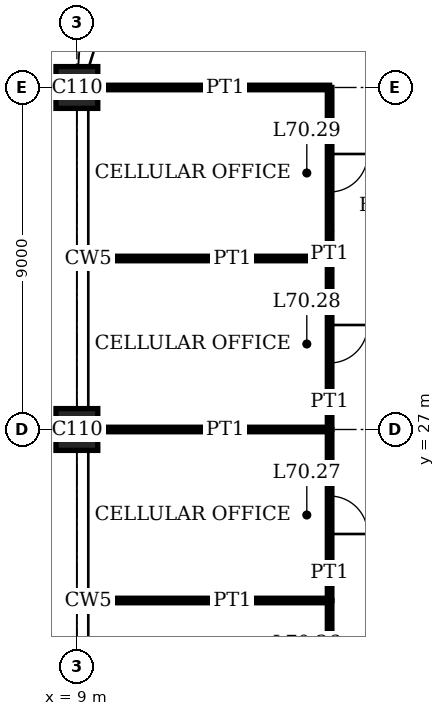
"""IFC4 building model, lengths in metres.
Left out: names, types, materials, properties, quantities, classifications, styles, units other than length and angle.
Written with IfcOpenShell. Run it as: python <this file> out.ifc"""

import sys

from ifc_helpers import new_model, si_unit, direction, frame, frame_2d, origin, origin_2d, place, context, subcontext, project, spatial, rectangle, extrude, element, fill, save


model = new_model("IFC4")
c1 = context("Model", 3, precision=1e-05, world=origin(), true_north=direction((0.0, 1.0)))
c2 = subcontext(c1, "Body", "Model", "MODEL_VIEW")
j1 = project(units=[si_unit("LENGTHUNIT", "METRE"), si_unit("PLANEANGLEUNIT", "RADIAN")], contexts=[c1])
p1 = place(None, origin())
s1 = spatial("IfcSite", under=j1, at=p1, CompositionType="ELEMENT")
p2 = place(p1, origin())
s2 = spatial("IfcBuilding", under=s1, at=p2, CompositionType="ELEMENT")
p3 = place(p2, frame((0.0, 0.0, 287.4)))
s3 = spatial("IfcBuildingStorey", under=s2, at=p3, CompositionType="ELEMENT", Elevation=287.4)
for number, where, z_axis, x_axis in (
    (1, (9.0, 27.0, 0.0), (0.0, 0.0, 1.0), (1.0, 0.0, 0.0)),
    (2, (9.0, 36.0, 0.0), (0.0, 0.0, 1.0), (1.0, 0.0, 0.0)),
):
    element("IfcColumn", number, at=place(p3, frame(where, z_axis=z_axis, x_axis=x_axis)), inside=s3, PredefinedType="COLUMN", context=c2, shape_type="SweptSolid", body=[
        extrude(rectangle(XDim=1.1, YDim=1.1, at=origin_2d()), origin(), (0.0, 0.0, 1.0), 4.0),
    ])
p4 = place(p3, frame((9.31, 22.5, 0.0), z_axis=(0.0, 0.0, 1.0), x_axis=(1.0, 0.0, 0.0)))
e3 = element("IfcWall", 3, at=p4, inside=s3, PredefinedType="PARTITIONING", context=c2, shape_type="SweptSolid", body=[
    extrude(rectangle(XDim=6.34, YDim=0.12, at=frame_2d((3.17, 0.0))), origin(), (0.0, 0.0, 1.0), 3.1),
])
p5 = place(p3, frame((9.55, 27.0, 0.0), z_axis=(0.0, 0.0, 1.0), x_axis=(1.0, 0.0, 0.0)))
e4 = element("IfcWall", 4, at=p5, inside=s3, PredefinedType="PARTITIONING", context=c2, shape_type="SweptSolid", body=[
    extrude(rectangle(XDim=6.1, YDim=0.12, at=frame_2d((3.05, 0.0))), origin(), (0.0, 0.0, 1.0), 3.05),
])
p6 = place(p3, frame((9.31, 31.5, 0.0), z_axis=(0.0, 0.0, 1.0), x_axis=(1.0, 0.0, 0.0)))
e5 = element("IfcWall", 5, at=p6, inside=s3, PredefinedType="PARTITIONING", context=c2, shape_type="SweptSolid", body=[
    extrude(rectangle(XDim=6.34, YDim=0.12, at=frame_2d((3.17, 0.0))), origin(), (0.0, 0.0, 1.0), 3.1),
])
p7 = place(p3, frame((9.55, 36.0, 0.0), z_axis=(0.0, 0.0, 1.0), x_axis=(1.0, 0.0, 0.0)))
e6 = element("IfcWall", 6, at=p7, inside=s3, PredefinedType="PARTITIONING", context=c2, shape_type="SweptSolid", body=[
    extrude(rectangle(XDim=6.1, YDim=0.12, at=frame_2d((3.05, 0.0))), origin(), (0.0, 0.0, 1.0), 3.05),
])
p8 = place(p3, frame((15.65, 18.0, 0.0), z_axis=(0.0, 0.0, 1.0), x_axis=(0.0, 1.0, 0.0)))
e7 = element("IfcWall", 7, at=p8, inside=s3, PredefinedType="PARTITIONING", context=c2, shape_type="SweptSolid", body=[
    extrude(rectangle(XDim=4.5, YDim=0.12, at=frame_2d((2.25, 0.0))), origin(), (0.0, 0.0, 1.0), 3.75),
])
p9 = place(p8, frame((1.75, 0.0, 0.0)))
e8 = element("IfcOpeningElement", 8, at=p9, cuts=e7, PredefinedType="OPENING", context=c2, shape_type="SweptSolid", body=[
    extrude(rectangle(XDim=1.0, YDim=2.4, at=frame_2d((0.5, 1.2))), frame((0.0, 0.07, 0.0), z_axis=(0.0, -1.0, 0.0), x_axis=(1.0, 0.0, 0.0)), (0.0, 0.0, 1.0), 0.14),
])
p10 = place(p3, frame((15.65, 22.5, 0.0), z_axis=(0.0, 0.0, 1.0), x_axis=(0.0, 1.0, 0.0)))
e9 = element("IfcWall", 9, at=p10, inside=s3, PredefinedType="PARTITIONING", context=c2, shape_type="SweptSolid", body=[
    extrude(rectangle(XDim=4.5, YDim=0.12, at=frame_2d((2.25, 0.0))), origin(), (0.0, 0.0, 1.0), 3.75),
])
p11 = place(p10, frame((1.75, 0.0, 0.0)))
e10 = element("IfcOpeningElement", 10, at=p11, cuts=e9, PredefinedType="OPENING", context=c2, shape_type="SweptSolid", body=[
    extrude(rectangle(XDim=1.0, YDim=2.4, at=frame_2d((0.5, 1.2))), frame((0.0, 0.07, 0.0), z_axis=(0.0, -1.0, 0.0), x_axis=(1.0, 0.0, 0.0)), (0.0, 0.0, 1.0), 0.14),
])
p12 = place(p3, frame((15.65, 27.0, 0.0), z_axis=(0.0, 0.0, 1.0), x_axis=(0.0, 1.0, 0.0)))
e11 = element("IfcWall", 11, at=p12, inside=s3, PredefinedType="PARTITIONING", context=c2, shape_type="SweptSolid", body=[
    extrude(rectangle(XDim=4.5, YDim=0.12, at=frame_2d((2.25, 0.0))), origin(), (0.0, 0.0, 1.0), 3.75),
])
p13 = place(p12, frame((1.75, 0.0, 0.0)))
e12 = element("IfcOpeningElement", 12, at=p13, cuts=e11, PredefinedType="OPENING", context=c2, shape_type="SweptSolid", body=[
    extrude(rectangle(XDim=1.0, YDim=2.4, at=frame_2d((0.5, 1.2))), frame((0.0, 0.07, 0.0), z_axis=(0.0, -1.0, 0.0), x_axis=(1.0, 0.0, 0.0)), (0.0, 0.0, 1.0), 0.14),
])
p14 = place(p3, frame((15.65, 31.5, 0.0), z_axis=(0.0, 0.0, 1.0), x_axis=(0.0, 1.0, 0.0)))
e13 = element("IfcWall", 13, at=p14, inside=s3, PredefinedType="PARTITIONING", context=c2, shape_type="SweptSolid", body=[
    extrude(rectangle(XDim=4.5, YDim=0.12, at=frame_2d((2.25, 0.0))), origin(), (0.0, 0.0, 1.0), 3.75),
])
p15 = place(p14, frame((1.75, 0.0, 0.0)))
e14 = element("IfcOpeningElement", 14, at=p15, cuts=e13, PredefinedType="OPENING", context=c2, shape_type="SweptSolid", body=[
    extrude(rectangle(XDim=1.0, YDim=2.4, at=frame_2d((0.5, 1.2))), frame((0.0, 0.07, 0.0), z_axis=(0.0, -1.0, 0.0), x_axis=(1.0, 0.0, 0.0)), (0.0, 0.0, 1.0), 0.14),
])
p16 = place(p11, origin())
e15 = element("IfcDoor", 15, at=p16, inside=s3, OperationType="SINGLE_SWING_LEFT", PredefinedType="DOOR", context=c2, shape_type="SweptSolid", body=[
    extrude(rectangle(XDim=1.0, YDim=2.4, at=frame_2d((0.5, 1.2))), frame((0.0, 0.025, 0.0), z_axis=(0.0, -1.0, 0.0), x_axis=(1.0, 0.0, 0.0)), (0.0, 0.0, 1.0), 0.05),
])
fill(e10, e15)
p17 = place(p13, origin())
e16 = element("IfcDoor", 16, at=p17, inside=s3, OperationType="SINGLE_SWING_RIGHT", PredefinedType="DOOR", context=c2, shape_type="SweptSolid", body=[
    extrude(rectangle(XDim=1.0, YDim=2.4, at=frame_2d((0.5, 1.2))), frame((0.0, 0.025, 0.0), z_axis=(0.0, -1.0, 0.0), x_axis=(1.0, 0.0, 0.0)), (0.0, 0.0, 1.0), 0.05),
])
fill(e12, e16)
p18 = place(p15, origin())
e17 = element("IfcDoor", 17, at=p18, inside=s3, OperationType="SINGLE_SWING_RIGHT", PredefinedType="DOOR", context=c2, shape_type="SweptSolid", body=[
    extrude(rectangle(XDim=1.0, YDim=2.4, at=frame_2d((0.5, 1.2))), frame((0.0, 0.025, 0.0), z_axis=(0.0, -1.0, 0.0), x_axis=(1.0, 0.0, 0.0)), (0.0, 0.0, 1.0), 0.05),
])
fill(e14, e17)
save(model, sys.argv[1])
